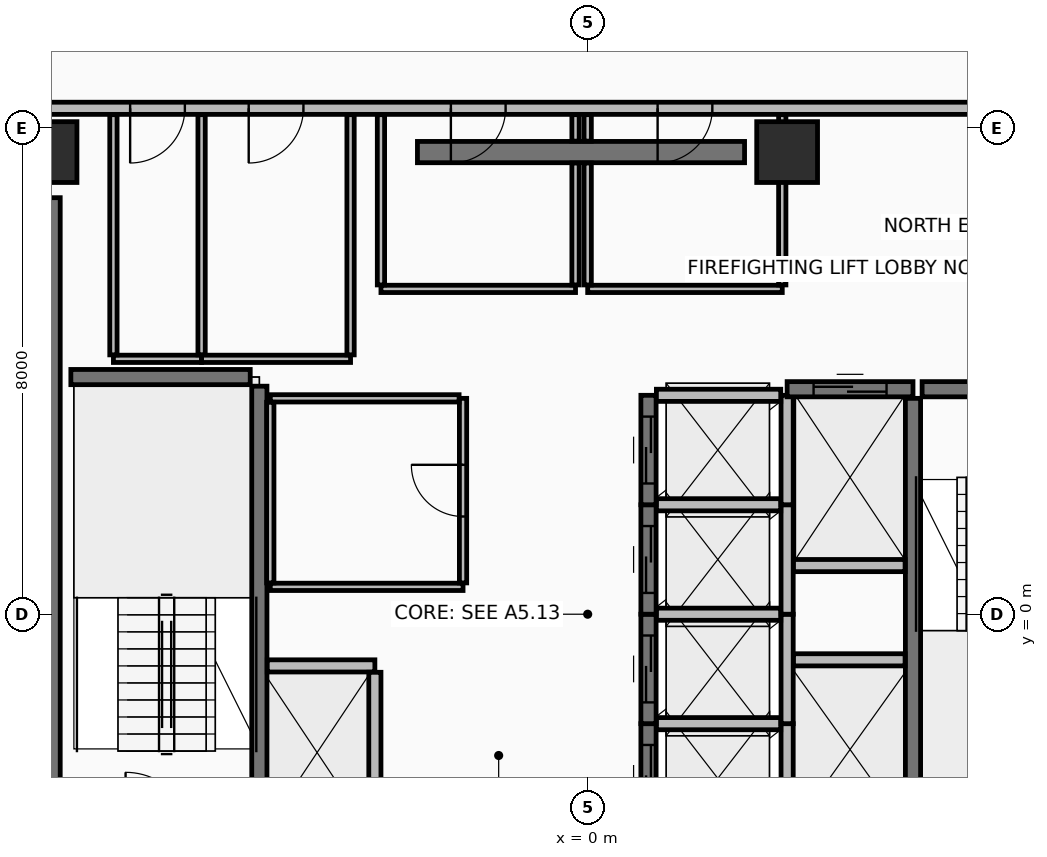
"""IFC4 building model, lengths in metres.
Left out: names, types, materials, properties, quantities, classifications, styles, units other than length and angle.
Written with IfcOpenShell. Run it as: python <this file> out.ifc"""

import sys

from ifc_helpers import new_model, si_unit, direction, frame, frame_2d, origin, origin_2d, place, context, subcontext, project, spatial, rectangle, extrude, element, fill, save


model = new_model("IFC4")
c1 = context("Model", 3, precision=1e-05, world=origin(), true_north=direction((0.0, 1.0)))
c2 = subcontext(c1, "Body", "Model", "MODEL_VIEW")
j1 = project(units=[si_unit("LENGTHUNIT", "METRE"), si_unit("PLANEANGLEUNIT", "RADIAN")], contexts=[c1])
p1 = place(None, origin())
s1 = spatial("IfcSite", under=j1, at=p1, CompositionType="ELEMENT")
p2 = place(p1, origin())
s2 = spatial("IfcBuilding", under=s1, at=p2, CompositionType="ELEMENT")
p3 = place(p2, frame((0.0, 0.0, 279.75)))
s3 = spatial("IfcBuildingStorey", under=s2, at=p3, CompositionType="ELEMENT", Elevation=279.75)
for number, where, z_axis, x_axis in (
    (1, (3.28, 7.6, 0.0), (0.0, 0.0, 1.0), (1.0, 0.0, 0.0)),
    (2, (-8.9, 7.6, 0.0), (0.0, 0.0, 1.0), (1.0, 0.0, 0.0)),
):
    element("IfcColumn", number, at=place(p3, frame(where, z_axis=z_axis, x_axis=x_axis)), inside=s3, PredefinedType="COLUMN", context=c2, shape_type="SweptSolid", body=[
        extrude(rectangle(XDim=1.0, YDim=1.0, at=origin_2d()), origin(), (0.0, 0.0, 1.0), 3.65),
    ])
p4 = place(p3, frame((-2.8, 7.6, 0.0), z_axis=(0.0, 0.0, 1.0), x_axis=(1.0, 0.0, 0.0)))
e3 = element("IfcWall", 3, at=p4, inside=s3, PredefinedType="SHEAR", context=c2, shape_type="SweptSolid", body=[
    extrude(rectangle(XDim=5.38, YDim=0.35, at=frame_2d((2.69, 0.0))), origin(), (0.0, 0.0, 1.0), 3.465),
])
p5 = place(p3, frame((-8.9, -3.85, 0.0), z_axis=(0.0, 0.0, 1.0), x_axis=(0.0, 1.0, 0.0)))
e4 = element("IfcWall", 4, at=p5, inside=s3, PredefinedType="SHEAR", context=c2, shape_type="SweptSolid", body=[
    extrude(rectangle(XDim=10.7, YDim=0.45, at=frame_2d((5.35, 0.0))), origin(), (0.0, 0.0, 1.0), 3.465),
])
p6 = place(p3, frame((9.62, 8.32, 0.0), z_axis=(0.0, 0.0, 1.0), x_axis=(-1.0, 0.0, 0.0)))
e5 = element("IfcWall", 5, at=p6, inside=s3, PredefinedType="PARTITIONING", context=c2, shape_type="SweptSolid", body=[
    extrude(rectangle(XDim=19.24, YDim=0.2, at=frame_2d((9.62, 0.0))), origin(), (0.0, 0.0, 1.0), 2.96),
])
p7 = place(p6, frame((10.97, 0.0, 0.0)))
e6 = element("IfcOpeningElement", 6, at=p7, cuts=e5, PredefinedType="OPENING", context=c2, shape_type="SweptSolid", body=[
    extrude(rectangle(XDim=0.9, YDim=2.1, at=frame_2d((0.45, 1.05))), frame((0.0, 0.11, 0.0), z_axis=(0.0, -1.0, 0.0), x_axis=(1.0, 0.0, 0.0)), (0.0, 0.0, 1.0), 0.22),
])
p8 = place(p6, frame((7.57, 0.0, 0.0)))
e7 = element("IfcOpeningElement", 7, at=p8, cuts=e5, PredefinedType="OPENING", context=c2, shape_type="SweptSolid", body=[
    extrude(rectangle(XDim=0.9, YDim=2.1, at=frame_2d((0.45, 1.05))), frame((0.0, 0.11, 0.0), z_axis=(0.0, -1.0, 0.0), x_axis=(1.0, 0.0, 0.0)), (0.0, 0.0, 1.0), 0.22),
])
p9 = place(p6, frame((16.245, 0.0, 0.0)))
e8 = element("IfcOpeningElement", 8, at=p9, cuts=e5, PredefinedType="OPENING", context=c2, shape_type="SweptSolid", body=[
    extrude(rectangle(XDim=0.9, YDim=2.1, at=frame_2d((0.45, 1.05))), frame((0.0, 0.11, 0.0), z_axis=(0.0, -1.0, 0.0), x_axis=(1.0, 0.0, 0.0)), (0.0, 0.0, 1.0), 0.22),
])
p10 = place(p6, frame((14.295, 0.0, 0.0)))
e9 = element("IfcOpeningElement", 9, at=p10, cuts=e5, PredefinedType="OPENING", context=c2, shape_type="SweptSolid", body=[
    extrude(rectangle(XDim=0.9, YDim=2.1, at=frame_2d((0.45, 1.05))), frame((0.0, 0.11, 0.0), z_axis=(0.0, -1.0, 0.0), x_axis=(1.0, 0.0, 0.0)), (0.0, 0.0, 1.0), 0.22),
])
p11 = place(p3, frame((-5.4, -3.55, 0.0), z_axis=(0.0, 0.0, 1.0), x_axis=(0.0, 1.0, 0.0)))
e10 = element("IfcWall", 10, at=p11, inside=s3, PredefinedType="SHEAR", context=c2, shape_type="SweptSolid", body=[
    extrude(rectangle(XDim=7.3, YDim=0.25, at=frame_2d((3.65, 0.0))), origin(), (0.0, 0.0, 1.0), 3.465),
])
p12 = place(p3, frame((-8.5, 3.9, 0.0), z_axis=(0.0, 0.0, 1.0), x_axis=(1.0, 0.0, 0.0)))
e11 = element("IfcWall", 11, at=p12, inside=s3, PredefinedType="SHEAR", context=c2, shape_type="SweptSolid", body=[
    extrude(rectangle(XDim=2.95, YDim=0.25, at=frame_2d((1.475, 0.0))), origin(), (0.0, 0.0, 1.0), 3.465),
])
p13 = place(p3, frame((5.35, -3.75, 0.0), z_axis=(0.0, 0.0, 1.0), x_axis=(0.0, 1.0, 0.0)))
e12 = element("IfcWall", 12, at=p13, inside=s3, PredefinedType="SHEAR", context=c2, shape_type="SweptSolid", body=[
    extrude(rectangle(XDim=7.3, YDim=0.25, at=frame_2d((3.65, 0.0))), origin(), (0.0, 0.0, 1.0), 3.465),
])
p14 = place(p3, frame((5.5, 3.7, 0.0), z_axis=(0.0, 0.0, 1.0), x_axis=(1.0, 0.0, 0.0)))
e13 = element("IfcWall", 13, at=p14, inside=s3, PredefinedType="SHEAR", context=c2, shape_type="SweptSolid", body=[
    extrude(rectangle(XDim=3.0, YDim=0.25, at=frame_2d((1.5, 0.0))), origin(), (0.0, 0.0, 1.0), 3.465),
])
p15 = place(p14, frame((0.95, 0.0, 0.0)))
e14 = element("IfcOpeningElement", 14, at=p15, cuts=e13, PredefinedType="OPENING", context=c2, shape_type="SweptSolid", body=[
    extrude(rectangle(XDim=1.1, YDim=2.15, at=frame_2d((0.55, 1.075))), frame((0.0, 0.135, 0.0), z_axis=(0.0, -1.0, 0.0), x_axis=(1.0, 0.0, 0.0)), (0.0, 0.0, 1.0), 0.27),
])
p16 = place(p3, frame((1.0, -3.6, 0.0), z_axis=(0.0, 0.0, 1.0), x_axis=(0.0, 1.0, 0.0)))
e15 = element("IfcWall", 15, at=p16, inside=s3, PredefinedType="SHEAR", context=c2, shape_type="SweptSolid", body=[
    extrude(rectangle(XDim=1.8, YDim=0.25, at=frame_2d((0.9, 0.0))), origin(), (0.0, 0.0, 1.0), 3.465),
])
p17 = place(p16, frame((0.35, 0.0, 0.0)))
e16 = element("IfcOpeningElement", 16, at=p17, cuts=e15, PredefinedType="OPENING", context=c2, shape_type="SweptSolid", body=[
    extrude(rectangle(XDim=1.1, YDim=2.2, at=frame_2d((0.55, 1.1))), frame((0.0, 0.135, 0.0), z_axis=(0.0, -1.0, 0.0), x_axis=(1.0, 0.0, 0.0)), (0.0, 0.0, 1.0), 0.27),
])
p18 = place(p3, frame((3.28, -3.6, 0.0), z_axis=(0.0, 0.0, 1.0), x_axis=(0.0, 1.0, 0.0)))
e17 = element("IfcWall", 17, at=p18, inside=s3, PredefinedType="PARTITIONING", context=c2, shape_type="SweptSolid", body=[
    extrude(rectangle(XDim=1.8, YDim=0.2, at=frame_2d((0.9, 0.0))), origin(), (0.0, 0.0, 1.0), 3.465),
])
p19 = place(p3, frame((1.13, -1.8, 0.0), z_axis=(0.0, 0.0, 1.0), x_axis=(1.0, 0.0, 0.0)))
e18 = element("IfcWall", 18, at=p19, inside=s3, PredefinedType="PARTITIONING", context=c2, shape_type="SweptSolid", body=[
    extrude(rectangle(XDim=2.045, YDim=0.2, at=frame_2d((1.022, 0.0))), origin(), (0.0, 0.0, 1.0), 3.465),
])
p20 = place(p3, frame((1.0, -1.8, 0.0), z_axis=(0.0, 0.0, 1.0), x_axis=(0.0, 1.0, 0.0)))
e19 = element("IfcWall", 19, at=p20, inside=s3, PredefinedType="SHEAR", context=c2, shape_type="SweptSolid", body=[
    extrude(rectangle(XDim=1.8, YDim=0.25, at=frame_2d((0.9, 0.0))), origin(), (0.0, 0.0, 1.0), 3.465),
])
p21 = place(p20, frame((0.35, 0.0, 0.0)))
e20 = element("IfcOpeningElement", 20, at=p21, cuts=e19, PredefinedType="OPENING", context=c2, shape_type="SweptSolid", body=[
    extrude(rectangle(XDim=1.1, YDim=2.2, at=frame_2d((0.55, 1.1))), frame((0.0, 0.135, 0.0), z_axis=(0.0, -1.0, 0.0), x_axis=(1.0, 0.0, 0.0)), (0.0, 0.0, 1.0), 0.27),
])
p22 = place(p3, frame((3.28, -1.8, 0.0), z_axis=(0.0, 0.0, 1.0), x_axis=(0.0, 1.0, 0.0)))
e21 = element("IfcWall", 21, at=p22, inside=s3, PredefinedType="PARTITIONING", context=c2, shape_type="SweptSolid", body=[
    extrude(rectangle(XDim=1.8, YDim=0.2, at=frame_2d((0.9, 0.0))), origin(), (0.0, 0.0, 1.0), 3.465),
])
p23 = place(p3, frame((1.13, 0.0, 0.0), z_axis=(0.0, 0.0, 1.0), x_axis=(1.0, 0.0, 0.0)))
e22 = element("IfcWall", 22, at=p23, inside=s3, PredefinedType="PARTITIONING", context=c2, shape_type="SweptSolid", body=[
    extrude(rectangle(XDim=2.045, YDim=0.2, at=frame_2d((1.022, 0.0))), origin(), (0.0, 0.0, 1.0), 3.465),
])
p24 = place(p3, frame((1.0, 0.0, 0.0), z_axis=(0.0, 0.0, 1.0), x_axis=(0.0, 1.0, 0.0)))
e23 = element("IfcWall", 23, at=p24, inside=s3, PredefinedType="SHEAR", context=c2, shape_type="SweptSolid", body=[
    extrude(rectangle(XDim=1.8, YDim=0.25, at=frame_2d((0.9, 0.0))), origin(), (0.0, 0.0, 1.0), 3.465),
])
p25 = place(p24, frame((0.35, 0.0, 0.0)))
e24 = element("IfcOpeningElement", 24, at=p25, cuts=e23, PredefinedType="OPENING", context=c2, shape_type="SweptSolid", body=[
    extrude(rectangle(XDim=1.1, YDim=2.2, at=frame_2d((0.55, 1.1))), frame((0.0, 0.135, 0.0), z_axis=(0.0, -1.0, 0.0), x_axis=(1.0, 0.0, 0.0)), (0.0, 0.0, 1.0), 0.27),
])
p26 = place(p3, frame((3.28, 0.0, 0.0), z_axis=(0.0, 0.0, 1.0), x_axis=(0.0, 1.0, 0.0)))
e25 = element("IfcWall", 25, at=p26, inside=s3, PredefinedType="PARTITIONING", context=c2, shape_type="SweptSolid", body=[
    extrude(rectangle(XDim=1.8, YDim=0.2, at=frame_2d((0.9, 0.0))), origin(), (0.0, 0.0, 1.0), 3.465),
])
p27 = place(p3, frame((1.13, 1.8, 0.0), z_axis=(0.0, 0.0, 1.0), x_axis=(1.0, 0.0, 0.0)))
e26 = element("IfcWall", 26, at=p27, inside=s3, PredefinedType="PARTITIONING", context=c2, shape_type="SweptSolid", body=[
    extrude(rectangle(XDim=2.045, YDim=0.2, at=frame_2d((1.022, 0.0))), origin(), (0.0, 0.0, 1.0), 3.465),
])
p28 = place(p3, frame((1.0, 1.8, 0.0), z_axis=(0.0, 0.0, 1.0), x_axis=(0.0, 1.0, 0.0)))
e27 = element("IfcWall", 27, at=p28, inside=s3, PredefinedType="SHEAR", context=c2, shape_type="SweptSolid", body=[
    extrude(rectangle(XDim=1.8, YDim=0.25, at=frame_2d((0.9, 0.0))), origin(), (0.0, 0.0, 1.0), 3.465),
])
p29 = place(p28, frame((0.35, 0.0, 0.0)))
e28 = element("IfcOpeningElement", 28, at=p29, cuts=e27, PredefinedType="OPENING", context=c2, shape_type="SweptSolid", body=[
    extrude(rectangle(XDim=1.1, YDim=2.2, at=frame_2d((0.55, 1.1))), frame((0.0, 0.135, 0.0), z_axis=(0.0, -1.0, 0.0), x_axis=(1.0, 0.0, 0.0)), (0.0, 0.0, 1.0), 0.27),
])
p30 = place(p3, frame((3.28, 1.8, 0.0), z_axis=(0.0, 0.0, 1.0), x_axis=(0.0, 1.0, 0.0)))
e29 = element("IfcWall", 29, at=p30, inside=s3, PredefinedType="PARTITIONING", context=c2, shape_type="SweptSolid", body=[
    extrude(rectangle(XDim=1.8, YDim=0.2, at=frame_2d((0.9, 0.0))), origin(), (0.0, 0.0, 1.0), 3.465),
])
p31 = place(p3, frame((1.13, 3.6, 0.0), z_axis=(0.0, 0.0, 1.0), x_axis=(1.0, 0.0, 0.0)))
e30 = element("IfcWall", 30, at=p31, inside=s3, PredefinedType="PARTITIONING", context=c2, shape_type="SweptSolid", body=[
    extrude(rectangle(XDim=2.045, YDim=0.2, at=frame_2d((1.022, 0.0))), origin(), (0.0, 0.0, 1.0), 2.76),
])
p32 = place(p3, frame((-5.27, -0.85, 0.0), z_axis=(0.0, 0.0, 1.0), x_axis=(1.0, 0.0, 0.0)))
e31 = element("IfcWall", 31, at=p32, inside=s3, PredefinedType="PARTITIONING", context=c2, shape_type="SweptSolid", body=[
    extrude(rectangle(XDim=1.77, YDim=0.2, at=frame_2d((0.885, 0.0))), origin(), (0.0, 0.0, 1.0), 3.465),
])
p33 = place(p3, frame((-3.5, -3.57, 0.0), z_axis=(0.0, 0.0, 1.0), x_axis=(0.0, 1.0, 0.0)))
e32 = element("IfcWall", 32, at=p33, inside=s3, PredefinedType="PARTITIONING", context=c2, shape_type="SweptSolid", body=[
    extrude(rectangle(XDim=2.615, YDim=0.2, at=frame_2d((1.308, 0.0))), origin(), (0.0, 0.0, 1.0), 3.465),
])
p34 = place(p3, frame((3.28, 3.7, 0.0), z_axis=(0.0, 0.0, 1.0), x_axis=(1.0, 0.0, 0.0)))
e33 = element("IfcWall", 33, at=p34, inside=s3, PredefinedType="SHEAR", context=c2, shape_type="SweptSolid", body=[
    extrude(rectangle(XDim=2.07, YDim=0.25, at=frame_2d((1.035, 0.0))), origin(), (0.0, 0.0, 1.0), 3.465),
])
p35 = place(p34, frame((0.435, 0.0, 0.0)))
e34 = element("IfcOpeningElement", 34, at=p35, cuts=e33, PredefinedType="OPENING", context=c2, shape_type="SweptSolid", body=[
    extrude(rectangle(XDim=1.2, YDim=2.2, at=frame_2d((0.6, 1.1))), frame((0.0, 0.135, 0.0), z_axis=(0.0, -1.0, 0.0), x_axis=(1.0, 0.0, 0.0)), (0.0, 0.0, 1.0), 0.27),
])
for number, where, z_axis, x_axis in (
    (35, (3.385, 0.8, 0.0), (0.0, 0.0, 1.0), (1.0, 0.0, 0.0)),
    (36, (3.385, -0.75, 0.0), (0.0, 0.0, 1.0), (1.0, 0.0, 0.0)),
):
    element("IfcWall", number, at=place(p3, frame(where, z_axis=z_axis, x_axis=x_axis)), inside=s3, PredefinedType="PARTITIONING", context=c2, shape_type="SweptSolid", body=[
        extrude(rectangle(XDim=1.835, YDim=0.2, at=frame_2d((0.917, 0.0))), origin(), (0.0, 0.0, 1.0), 3.465),
    ])
p36 = place(p3, frame((-5.22, 0.45, 0.0), z_axis=(0.0, 0.0, 1.0), x_axis=(1.0, 0.0, 0.0)))
e37 = element("IfcWall", 37, at=p36, inside=s3, PredefinedType="PARTITIONING", context=c2, shape_type="SweptSolid", body=[
    extrude(rectangle(XDim=3.17, YDim=0.12, at=frame_2d((1.585, 0.0))), origin(), (0.0, 0.0, 1.0), 3.465),
])
p37 = place(p3, frame((-2.05, 0.515, 0.0), z_axis=(0.0, 0.0, 1.0), x_axis=(0.0, 1.0, 0.0)))
e38 = element("IfcWall", 38, at=p37, inside=s3, PredefinedType="PARTITIONING", context=c2, shape_type="SweptSolid", body=[
    extrude(rectangle(XDim=3.035, YDim=0.12, at=frame_2d((1.518, 0.0))), origin(), (0.0, 0.0, 1.0), 3.465),
])
p38 = place(p37, frame((1.092, 0.0, 0.0)))
e39 = element("IfcOpeningElement", 39, at=p38, cuts=e38, PredefinedType="OPENING", context=c2, shape_type="SweptSolid", body=[
    extrude(rectangle(XDim=0.85, YDim=2.1, at=frame_2d((0.425, 1.05))), frame((0.0, 0.07, 0.0), z_axis=(0.0, -1.0, 0.0), x_axis=(1.0, 0.0, 0.0)), (0.0, 0.0, 1.0), 0.14),
])
p39 = place(p3, frame((-2.115, 3.55, 0.0), z_axis=(0.0, 0.0, 1.0), x_axis=(-1.0, 0.0, 0.0)))
e40 = element("IfcWall", 40, at=p39, inside=s3, PredefinedType="PARTITIONING", context=c2, shape_type="SweptSolid", body=[
    extrude(rectangle(XDim=3.105, YDim=0.12, at=frame_2d((1.552, 0.0))), origin(), (0.0, 0.0, 1.0), 3.465),
])
p40 = place(p3, frame((-5.22, 3.485, 0.0), z_axis=(0.0, 0.0, 1.0), x_axis=(0.0, -1.0, 0.0)))
e41 = element("IfcWall", 41, at=p40, inside=s3, PredefinedType="PARTITIONING", context=c2, shape_type="SweptSolid", body=[
    extrude(rectangle(XDim=2.97, YDim=0.12, at=frame_2d((1.485, 0.0))), origin(), (0.0, 0.0, 1.0), 3.465),
])
p41 = place(p3, frame((-3.4, 5.35, 0.0), z_axis=(0.0, 0.0, 1.0), x_axis=(1.0, 0.0, 0.0)))
e42 = element("IfcWall", 42, at=p41, inside=s3, PredefinedType="PARTITIONING", context=c2, shape_type="SweptSolid", body=[
    extrude(rectangle(XDim=3.2, YDim=0.12, at=frame_2d((1.6, 0.0))), origin(), (0.0, 0.0, 1.0), 3.465),
])
p42 = place(p3, frame((-0.2, 5.415, 0.0), z_axis=(0.0, 0.0, 1.0), x_axis=(0.0, 1.0, 0.0)))
e43 = element("IfcWall", 43, at=p42, inside=s3, PredefinedType="PARTITIONING", context=c2, shape_type="SweptSolid", body=[
    extrude(rectangle(XDim=2.005, YDim=0.12, at=frame_2d((1.002, 0.0))), origin(), (0.0, 0.0, 1.0), 2.76),
])
p43 = place(p3, frame((-0.2, 7.78, 0.0), z_axis=(0.0, 0.0, 1.0), x_axis=(0.0, 1.0, 0.0)))
e44 = element("IfcWall", 44, at=p43, inside=s3, PredefinedType="PARTITIONING", context=c2, shape_type="SweptSolid", body=[
    extrude(rectangle(XDim=0.435, YDim=0.12, at=frame_2d((0.218, 0.0))), origin(), (0.0, 0.0, 1.0), 2.76),
])
p44 = place(p3, frame((-3.4, 8.215, 0.0), z_axis=(0.0, 0.0, 1.0), x_axis=(0.0, -1.0, 0.0)))
e45 = element("IfcWall", 45, at=p44, inside=s3, PredefinedType="PARTITIONING", context=c2, shape_type="SweptSolid", body=[
    extrude(rectangle(XDim=2.8, YDim=0.12, at=frame_2d((1.4, 0.0))), origin(), (0.0, 0.0, 1.0), 2.76),
])
p45 = place(p3, frame((0.0, 5.35, 0.0), z_axis=(0.0, 0.0, 1.0), x_axis=(1.0, 0.0, 0.0)))
e46 = element("IfcWall", 46, at=p45, inside=s3, PredefinedType="PARTITIONING", context=c2, shape_type="SweptSolid", body=[
    extrude(rectangle(XDim=3.2, YDim=0.12, at=frame_2d((1.6, 0.0))), origin(), (0.0, 0.0, 1.0), 2.76),
])
p46 = place(p3, frame((3.2, 5.415, 0.0), z_axis=(0.0, 0.0, 1.0), x_axis=(0.0, 1.0, 0.0)))
e47 = element("IfcWall", 47, at=p46, inside=s3, PredefinedType="PARTITIONING", context=c2, shape_type="SweptSolid", body=[
    extrude(rectangle(XDim=2.8, YDim=0.12, at=frame_2d((1.4, 0.0))), origin(), (0.0, 0.0, 1.0), 2.76),
])
p47 = place(p3, frame((0.0, 8.215, 0.0), z_axis=(0.0, 0.0, 1.0), x_axis=(0.0, -1.0, 0.0)))
e48 = element("IfcWall", 48, at=p47, inside=s3, PredefinedType="PARTITIONING", context=c2, shape_type="SweptSolid", body=[
    extrude(rectangle(XDim=0.435, YDim=0.12, at=frame_2d((0.218, 0.0))), origin(), (0.0, 0.0, 1.0), 2.76),
])
p48 = place(p3, frame((0.0, 7.42, 0.0), z_axis=(0.0, 0.0, 1.0), x_axis=(0.0, -1.0, 0.0)))
e49 = element("IfcWall", 49, at=p48, inside=s3, PredefinedType="PARTITIONING", context=c2, shape_type="SweptSolid", body=[
    extrude(rectangle(XDim=2.005, YDim=0.12, at=frame_2d((1.002, 0.0))), origin(), (0.0, 0.0, 1.0), 2.76),
])
p49 = place(p3, frame((-7.8, 4.2, 0.0), z_axis=(0.0, 0.0, 1.0), x_axis=(1.0, 0.0, 0.0)))
e50 = element("IfcWall", 50, at=p49, inside=s3, PredefinedType="PARTITIONING", context=c2, shape_type="SweptSolid", body=[
    extrude(rectangle(XDim=1.45, YDim=0.12, at=frame_2d((0.725, 0.0))), origin(), (0.0, 0.0, 1.0), 3.465),
])
for number, where, z_axis, x_axis in (
    (51, (-6.35, 4.265, 0.0), (0.0, 0.0, 1.0), (0.0, 1.0, 0.0)),
    (52, (-7.8, 8.215, 0.0), (0.0, 0.0, 1.0), (0.0, -1.0, 0.0)),
):
    element("IfcWall", number, at=place(p3, frame(where, z_axis=z_axis, x_axis=x_axis)), inside=s3, PredefinedType="PARTITIONING", context=c2, shape_type="SweptSolid", body=[
        extrude(rectangle(XDim=3.95, YDim=0.12, at=frame_2d((1.975, 0.0))), origin(), (0.0, 0.0, 1.0), 2.76),
    ])
p50 = place(p3, frame((-6.35, 4.2, 0.0), z_axis=(0.0, 0.0, 1.0), x_axis=(1.0, 0.0, 0.0)))
e53 = element("IfcWall", 53, at=p50, inside=s3, PredefinedType="PARTITIONING", context=c2, shape_type="SweptSolid", body=[
    extrude(rectangle(XDim=2.45, YDim=0.12, at=frame_2d((1.225, 0.0))), origin(), (0.0, 0.0, 1.0), 3.465),
])
p51 = place(p3, frame((-3.9, 4.265, 0.0), z_axis=(0.0, 0.0, 1.0), x_axis=(0.0, 1.0, 0.0)))
e54 = element("IfcWall", 54, at=p51, inside=s3, PredefinedType="PARTITIONING", context=c2, shape_type="SweptSolid", body=[
    extrude(rectangle(XDim=3.95, YDim=0.12, at=frame_2d((1.975, 0.0))), origin(), (0.0, 0.0, 1.0), 2.76),
])
p52 = place(p17, origin())
e55 = element("IfcDoor", 55, at=p52, inside=s3, OperationType="SLIDING_TO_LEFT", PredefinedType="DOOR", context=c2, shape_type="SweptSolid", body=[
    extrude(rectangle(XDim=1.1, YDim=2.2, at=frame_2d((0.55, 1.1))), frame((0.0, 0.025, 0.0), z_axis=(0.0, -1.0, 0.0), x_axis=(1.0, 0.0, 0.0)), (0.0, 0.0, 1.0), 0.05),
])
fill(e16, e55)
p53 = place(p21, origin())
e56 = element("IfcDoor", 56, at=p53, inside=s3, OperationType="SLIDING_TO_LEFT", PredefinedType="DOOR", context=c2, shape_type="SweptSolid", body=[
    extrude(rectangle(XDim=1.1, YDim=2.2, at=frame_2d((0.55, 1.1))), frame((0.0, 0.025, 0.0), z_axis=(0.0, -1.0, 0.0), x_axis=(1.0, 0.0, 0.0)), (0.0, 0.0, 1.0), 0.05),
])
fill(e20, e56)
p54 = place(p25, origin())
e57 = element("IfcDoor", 57, at=p54, inside=s3, OperationType="SLIDING_TO_LEFT", PredefinedType="DOOR", context=c2, shape_type="SweptSolid", body=[
    extrude(rectangle(XDim=1.1, YDim=2.2, at=frame_2d((0.55, 1.1))), frame((0.0, 0.025, 0.0), z_axis=(0.0, -1.0, 0.0), x_axis=(1.0, 0.0, 0.0)), (0.0, 0.0, 1.0), 0.05),
])
fill(e24, e57)
p55 = place(p29, origin())
e58 = element("IfcDoor", 58, at=p55, inside=s3, OperationType="SLIDING_TO_LEFT", PredefinedType="DOOR", context=c2, shape_type="SweptSolid", body=[
    extrude(rectangle(XDim=1.1, YDim=2.2, at=frame_2d((0.55, 1.1))), frame((0.0, 0.025, 0.0), z_axis=(0.0, -1.0, 0.0), x_axis=(1.0, 0.0, 0.0)), (0.0, 0.0, 1.0), 0.05),
])
fill(e28, e58)
p56 = place(p35, origin())
e59 = element("IfcDoor", 59, at=p56, inside=s3, OperationType="SLIDING_TO_RIGHT", PredefinedType="DOOR", context=c2, shape_type="SweptSolid", body=[
    extrude(rectangle(XDim=1.2, YDim=2.2, at=frame_2d((0.6, 1.1))), frame((0.0, 0.025, 0.0), z_axis=(0.0, -1.0, 0.0), x_axis=(1.0, 0.0, 0.0)), (0.0, 0.0, 1.0), 0.05),
])
fill(e34, e59)
p57 = place(p38, frame((0.85, 0.0, 0.0), z_axis=(0.0, 0.0, 1.0), x_axis=(-1.0, 0.0, 0.0)))
e60 = element("IfcDoor", 60, at=p57, inside=s3, OperationType="SINGLE_SWING_RIGHT", PredefinedType="DOOR", context=c2, shape_type="SweptSolid", body=[
    extrude(rectangle(XDim=0.85, YDim=2.1, at=frame_2d((0.425, 1.05))), frame((0.0, 0.025, 0.0), z_axis=(0.0, -1.0, 0.0), x_axis=(1.0, 0.0, 0.0)), (0.0, 0.0, 1.0), 0.05),
])
fill(e39, e60)
p58 = place(p7, frame((0.9, 0.0, 0.0), z_axis=(0.0, 0.0, 1.0), x_axis=(-1.0, 0.0, 0.0)))
e61 = element("IfcDoor", 61, at=p58, inside=s3, OperationType="SINGLE_SWING_LEFT", PredefinedType="DOOR", context=c2, shape_type="SweptSolid", body=[
    extrude(rectangle(XDim=0.9, YDim=2.1, at=frame_2d((0.45, 1.05))), frame((0.0, 0.025, 0.0), z_axis=(0.0, -1.0, 0.0), x_axis=(1.0, 0.0, 0.0)), (0.0, 0.0, 1.0), 0.05),
])
fill(e6, e61)
p59 = place(p8, frame((0.9, 0.0, 0.0), z_axis=(0.0, 0.0, 1.0), x_axis=(-1.0, 0.0, 0.0)))
e62 = element("IfcDoor", 62, at=p59, inside=s3, OperationType="SINGLE_SWING_LEFT", PredefinedType="DOOR", context=c2, shape_type="SweptSolid", body=[
    extrude(rectangle(XDim=0.9, YDim=2.1, at=frame_2d((0.45, 1.05))), frame((0.0, 0.025, 0.0), z_axis=(0.0, -1.0, 0.0), x_axis=(1.0, 0.0, 0.0)), (0.0, 0.0, 1.0), 0.05),
])
fill(e7, e62)
p60 = place(p9, frame((0.9, 0.0, 0.0), z_axis=(0.0, 0.0, 1.0), x_axis=(-1.0, 0.0, 0.0)))
e63 = element("IfcDoor", 63, at=p60, inside=s3, OperationType="SINGLE_SWING_LEFT", PredefinedType="DOOR", context=c2, shape_type="SweptSolid", body=[
    extrude(rectangle(XDim=0.9, YDim=2.1, at=frame_2d((0.45, 1.05))), frame((0.0, 0.025, 0.0), z_axis=(0.0, -1.0, 0.0), x_axis=(1.0, 0.0, 0.0)), (0.0, 0.0, 1.0), 0.05),
])
fill(e8, e63)
p61 = place(p10, frame((0.9, 0.0, 0.0), z_axis=(0.0, 0.0, 1.0), x_axis=(-1.0, 0.0, 0.0)))
e64 = element("IfcDoor", 64, at=p61, inside=s3, OperationType="SINGLE_SWING_LEFT", PredefinedType="DOOR", context=c2, shape_type="SweptSolid", body=[
    extrude(rectangle(XDim=0.9, YDim=2.1, at=frame_2d((0.45, 1.05))), frame((0.0, 0.025, 0.0), z_axis=(0.0, -1.0, 0.0), x_axis=(1.0, 0.0, 0.0)), (0.0, 0.0, 1.0), 0.05),
])
fill(e9, e64)
save(model, sys.argv[1])
